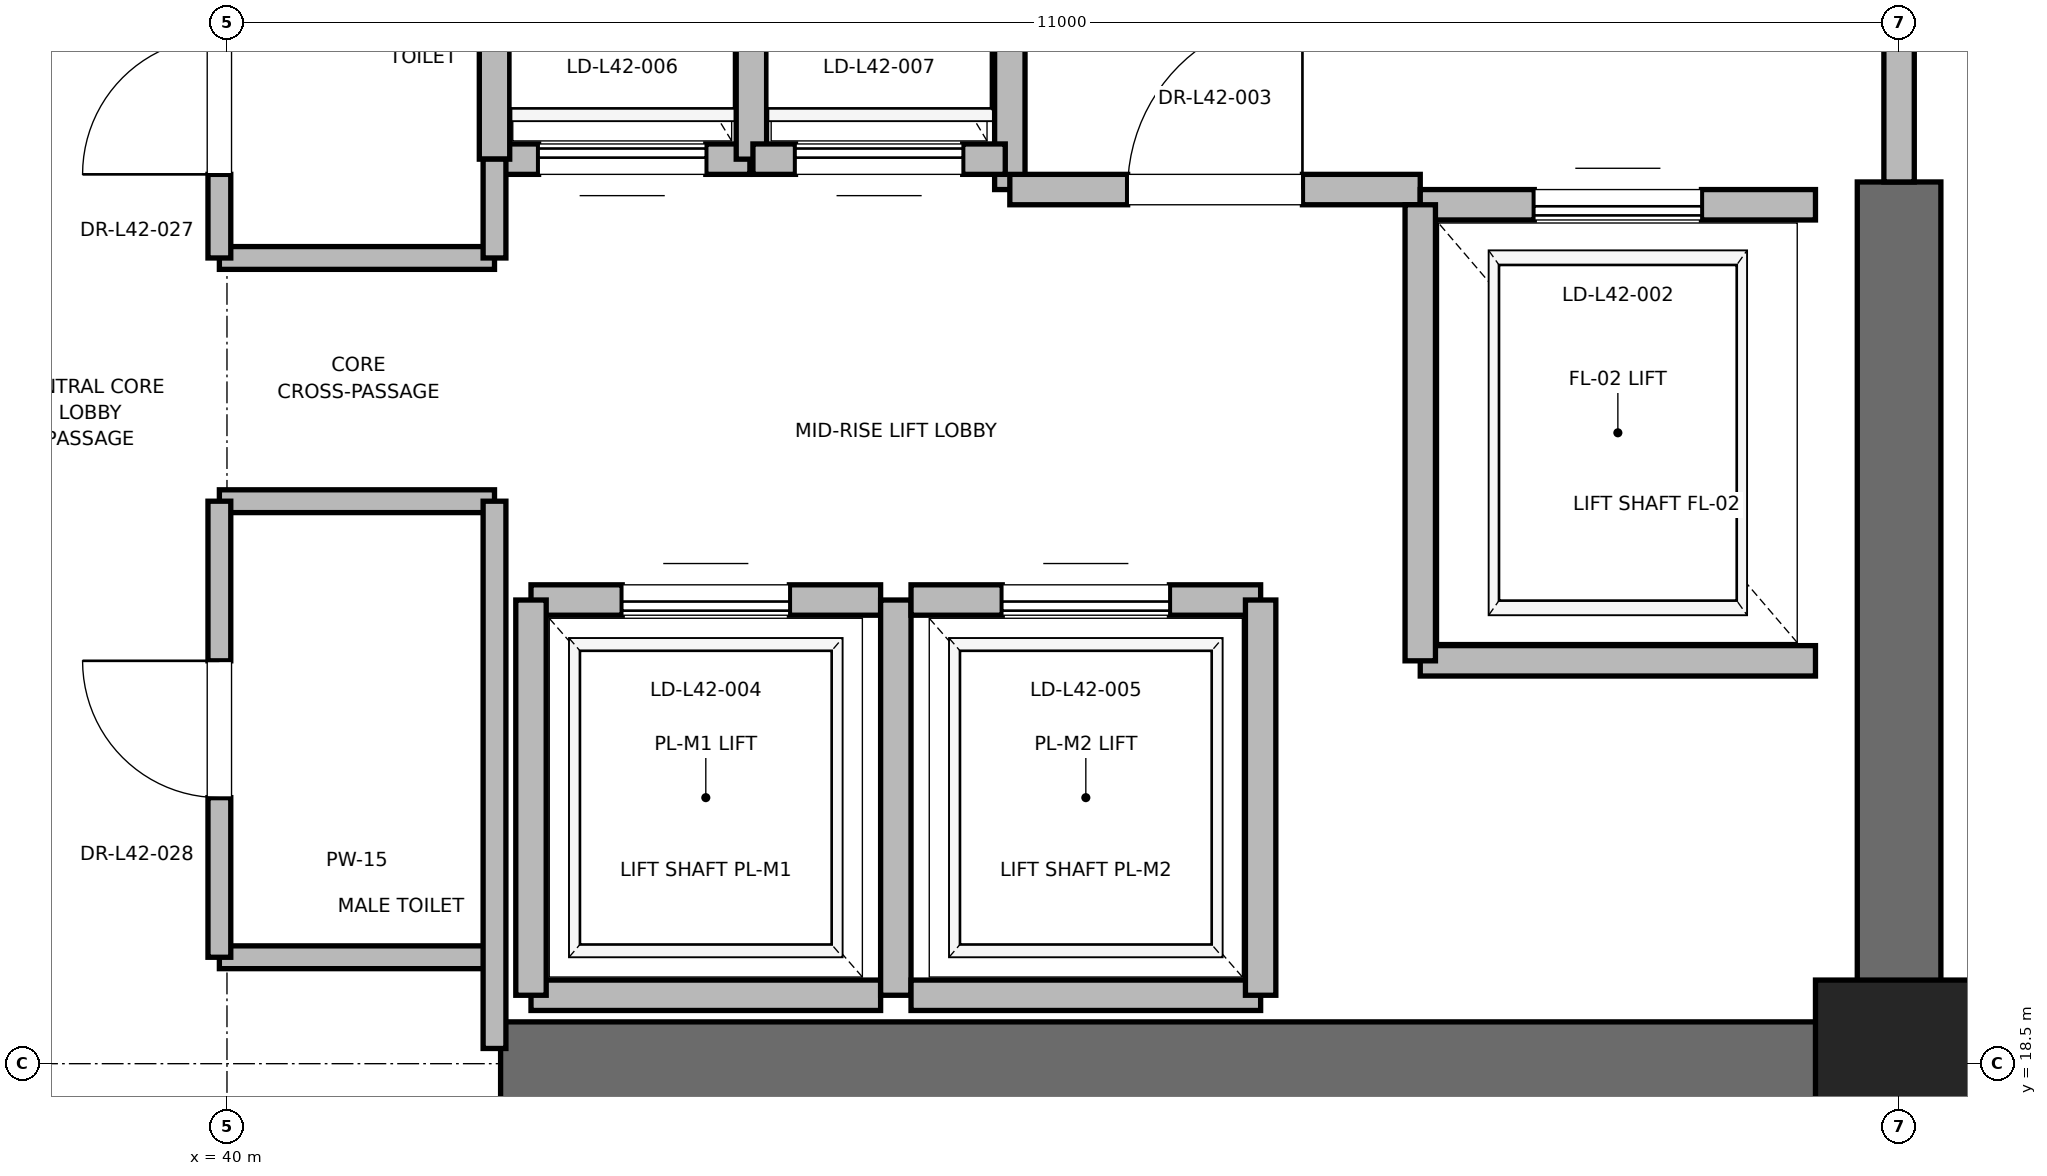
"""IFC4 building model, lengths in metres.
Left out: names, types, materials, properties, quantities, classifications, styles, units other than length and angle.
Written with IfcOpenShell. Run it as: python <this file> out.ifc"""

import sys

from ifc_helpers import new_model, si_unit, direction, frame, frame_2d, origin, origin_2d, place, context, subcontext, project, spatial, rectangle, extrude, element, fill, save


model = new_model("IFC4")
c1 = context("Model", 3, precision=1e-05, world=origin(), true_north=direction((0.0, 1.0)))
c2 = subcontext(c1, "Body", "Model", "MODEL_VIEW")
j1 = project(units=[si_unit("LENGTHUNIT", "METRE"), si_unit("PLANEANGLEUNIT", "RADIAN")], contexts=[c1])
p1 = place(None, origin())
s1 = spatial("IfcSite", under=j1, at=p1, CompositionType="ELEMENT")
p2 = place(p1, origin())
s2 = spatial("IfcBuilding", under=s1, at=p2, CompositionType="ELEMENT")
p3 = place(p2, frame((0.0, 0.0, 180.4)))
s3 = spatial("IfcBuildingStorey", under=s2, at=p3, CompositionType="ELEMENT", Elevation=180.4)
p4 = place(p3, frame((51.0, 18.5, 0.0), z_axis=(0.0, 0.0, 1.0), x_axis=(1.0, 0.0, 0.0)))
e1 = element("IfcColumn", 1, at=p4, inside=s3, PredefinedType="PILASTER", context=c2, shape_type="SweptSolid", body=[
    extrude(rectangle(XDim=1.1, YDim=1.1, at=origin_2d()), origin(), (0.0, 0.0, 1.0), 4.0),
])
p5 = place(p3, frame((41.8, 18.5, 0.0), z_axis=(0.0, 0.0, 1.0), x_axis=(1.0, 0.0, 0.0)))
e2 = element("IfcWall", 2, at=p5, inside=s3, PredefinedType="SHEAR", context=c2, shape_type="SweptSolid", body=[
    extrude(rectangle(XDim=9.2, YDim=0.55, at=frame_2d((4.6, 0.0))), origin(), (0.0, 0.0, 1.0), 3.7),
])
p6 = place(p3, frame((51.0, 18.5, 0.0), z_axis=(0.0, 0.0, 1.0), x_axis=(0.0, 1.0, 0.0)))
e3 = element("IfcWall", 3, at=p6, inside=s3, PredefinedType="SHEAR", context=c2, shape_type="SweptSolid", body=[
    extrude(rectangle(XDim=5.8, YDim=0.55, at=frame_2d((2.9, 0.0))), origin(), (0.0, 0.0, 1.0), 3.7),
])
p7 = place(p3, frame((45.15, 24.25, 0.0), z_axis=(0.0, 0.0, 1.0), x_axis=(0.0, 1.0, 0.0)))
e4 = element("IfcWall", 4, at=p7, inside=s3, PredefinedType="PARTITIONING", context=c2, shape_type="SweptSolid", body=[
    extrude(rectangle(XDim=3.37, YDim=0.2, at=frame_2d((1.685, 0.0))), origin(), (0.0, 0.0, 1.0), 3.7),
])
p8 = place(p3, frame((45.15, 24.25, 0.0), z_axis=(0.0, 0.0, 1.0), x_axis=(1.0, 0.0, 0.0)))
e5 = element("IfcWall", 5, at=p8, inside=s3, PredefinedType="PARTITIONING", context=c2, shape_type="SweptSolid", body=[
    extrude(rectangle(XDim=2.7, YDim=0.2, at=frame_2d((1.35, 0.0))), origin(), (0.0, 0.0, 1.0), 3.7),
])
p9 = place(p8, frame((0.775, 0.0, 0.0)))
e6 = element("IfcOpeningElement", 6, at=p9, cuts=e5, PredefinedType="OPENING", context=c2, shape_type="SweptSolid", body=[
    extrude(rectangle(XDim=1.15, YDim=2.2, at=frame_2d((0.575, 1.1))), frame((0.0, 0.1, 0.0), z_axis=(0.0, -1.0, 0.0), x_axis=(1.0, 0.0, 0.0)), (0.0, 0.0, 1.0), 0.2),
])
p10 = place(p3, frame((51.0, 24.3, 0.0), z_axis=(0.0, 0.0, 1.0), x_axis=(0.0, 1.0, 0.0)))
e7 = element("IfcWall", 7, at=p10, inside=s3, PredefinedType="PARTITIONING", context=c2, shape_type="SweptSolid", body=[
    extrude(rectangle(XDim=3.4, YDim=0.2, at=frame_2d((1.7, 0.0))), origin(), (0.0, 0.0, 1.0), 2.68),
])
p11 = place(p10, frame((1.125, 0.0, 0.0)))
e8 = element("IfcOpeningElement", 8, at=p11, cuts=e7, PredefinedType="OPENING", context=c2, shape_type="SweptSolid", body=[
    extrude(rectangle(XDim=1.15, YDim=2.2, at=frame_2d((0.575, 1.1))), frame((0.0, 0.1, 0.0), z_axis=(0.0, -1.0, 0.0), x_axis=(1.0, 0.0, 0.0)), (0.0, 0.0, 1.0), 0.2),
])
p12 = place(p3, frame((47.85, 21.15, 0.0), z_axis=(0.0, 0.0, 1.0), x_axis=(1.0, 0.0, 0.0)))
e9 = element("IfcWall", 9, at=p12, inside=s3, PredefinedType="SOLIDWALL", context=c2, shape_type="SweptSolid", body=[
    extrude(rectangle(XDim=2.6, YDim=0.2, at=frame_2d((1.3, 0.0))), origin(), (0.0, 0.0, 1.0), 3.7),
])
p13 = place(p3, frame((50.45, 24.15, 0.0), z_axis=(0.0, 0.0, 1.0), x_axis=(-1.0, 0.0, 0.0)))
e10 = element("IfcWall", 10, at=p13, inside=s3, PredefinedType="SOLIDWALL", context=c2, shape_type="SweptSolid", body=[
    extrude(rectangle(XDim=2.6, YDim=0.2, at=frame_2d((1.3, 0.0))), origin(), (0.0, 0.0, 1.0), 2.68),
])
p14 = place(p13, frame((0.75, 0.0, 0.0)))
e11 = element("IfcOpeningElement", 11, at=p14, cuts=e10, PredefinedType="OPENING", context=c2, shape_type="SweptSolid", body=[
    extrude(rectangle(XDim=1.1, YDim=2.2, at=frame_2d((0.55, 1.1))), frame((0.0, 0.1, 0.0), z_axis=(0.0, -1.0, 0.0), x_axis=(1.0, 0.0, 0.0)), (0.0, 0.0, 1.0), 0.2),
])
p15 = place(p3, frame((47.85, 24.15, 0.0), z_axis=(0.0, 0.0, 1.0), x_axis=(0.0, -1.0, 0.0)))
e12 = element("IfcWall", 12, at=p15, inside=s3, PredefinedType="SOLIDWALL", context=c2, shape_type="SweptSolid", body=[
    extrude(rectangle(XDim=3.0, YDim=0.2, at=frame_2d((1.5, 0.0))), origin(), (0.0, 0.0, 1.0), 3.7),
])
p16 = place(p3, frame((42.0, 18.95, 0.0), z_axis=(0.0, 0.0, 1.0), x_axis=(1.0, 0.0, 0.0)))
e13 = element("IfcWall", 13, at=p16, inside=s3, PredefinedType="SOLIDWALL", context=c2, shape_type="SweptSolid", body=[
    extrude(rectangle(XDim=2.3, YDim=0.2, at=frame_2d((1.15, 0.0))), origin(), (0.0, 0.0, 1.0), 2.68),
])
p17 = place(p3, frame((44.3, 21.55, 0.0), z_axis=(0.0, 0.0, 1.0), x_axis=(-1.0, 0.0, 0.0)))
e14 = element("IfcWall", 14, at=p17, inside=s3, PredefinedType="SOLIDWALL", context=c2, shape_type="SweptSolid", body=[
    extrude(rectangle(XDim=2.3, YDim=0.2, at=frame_2d((1.15, 0.0))), origin(), (0.0, 0.0, 1.0), 3.7),
])
p18 = place(p17, frame((0.6, 0.0, 0.0)))
e15 = element("IfcOpeningElement", 15, at=p18, cuts=e14, PredefinedType="OPENING", context=c2, shape_type="SweptSolid", body=[
    extrude(rectangle(XDim=1.1, YDim=2.2, at=frame_2d((0.55, 1.1))), frame((0.0, 0.1, 0.0), z_axis=(0.0, -1.0, 0.0), x_axis=(1.0, 0.0, 0.0)), (0.0, 0.0, 1.0), 0.2),
])
p19 = place(p3, frame((42.0, 21.55, 0.0), z_axis=(0.0, 0.0, 1.0), x_axis=(0.0, -1.0, 0.0)))
e16 = element("IfcWall", 16, at=p19, inside=s3, PredefinedType="SOLIDWALL", context=c2, shape_type="SweptSolid", body=[
    extrude(rectangle(XDim=2.6, YDim=0.2, at=frame_2d((1.3, 0.0))), origin(), (0.0, 0.0, 1.0), 2.68),
])
p20 = place(p3, frame((44.4, 18.95, 0.0), z_axis=(0.0, 0.0, 1.0), x_axis=(0.0, 1.0, 0.0)))
e17 = element("IfcWall", 17, at=p20, inside=s3, PredefinedType="SOLIDWALL", context=c2, shape_type="SweptSolid", body=[
    extrude(rectangle(XDim=2.6, YDim=0.2, at=frame_2d((1.3, 0.0))), origin(), (0.0, 0.0, 1.0), 3.7),
])
p21 = place(p3, frame((44.5, 18.95, 0.0), z_axis=(0.0, 0.0, 1.0), x_axis=(1.0, 0.0, 0.0)))
e18 = element("IfcWall", 18, at=p21, inside=s3, PredefinedType="SOLIDWALL", context=c2, shape_type="SweptSolid", body=[
    extrude(rectangle(XDim=2.3, YDim=0.2, at=frame_2d((1.15, 0.0))), origin(), (0.0, 0.0, 1.0), 3.7),
])
p22 = place(p3, frame((46.8, 21.55, 0.0), z_axis=(0.0, 0.0, 1.0), x_axis=(-1.0, 0.0, 0.0)))
e19 = element("IfcWall", 19, at=p22, inside=s3, PredefinedType="SOLIDWALL", context=c2, shape_type="SweptSolid", body=[
    extrude(rectangle(XDim=2.3, YDim=0.2, at=frame_2d((1.15, 0.0))), origin(), (0.0, 0.0, 1.0), 3.7),
])
p23 = place(p22, frame((0.6, 0.0, 0.0)))
e20 = element("IfcOpeningElement", 20, at=p23, cuts=e19, PredefinedType="OPENING", context=c2, shape_type="SweptSolid", body=[
    extrude(rectangle(XDim=1.1, YDim=2.2, at=frame_2d((0.55, 1.1))), frame((0.0, 0.1, 0.0), z_axis=(0.0, -1.0, 0.0), x_axis=(1.0, 0.0, 0.0)), (0.0, 0.0, 1.0), 0.2),
])
p24 = place(p3, frame((46.8, 18.95, 0.0), z_axis=(0.0, 0.0, 1.0), x_axis=(0.0, 1.0, 0.0)))
e21 = element("IfcWall", 21, at=p24, inside=s3, PredefinedType="SOLIDWALL", context=c2, shape_type="SweptSolid", body=[
    extrude(rectangle(XDim=2.6, YDim=0.2, at=frame_2d((1.3, 0.0))), origin(), (0.0, 0.0, 1.0), 3.7),
])
p25 = place(p3, frame((41.76, 24.45, 0.0), z_axis=(0.0, 0.0, 1.0), x_axis=(1.0, 0.0, 0.0)))
e22 = element("IfcWall", 22, at=p25, inside=s3, PredefinedType="SOLIDWALL", context=c2, shape_type="SweptSolid", body=[
    extrude(rectangle(XDim=1.68, YDim=0.2, at=frame_2d((0.84, 0.0))), origin(), (0.0, 0.0, 1.0), 3.7),
])
p26 = place(p25, frame((0.29, 0.0, 0.0)))
e23 = element("IfcOpeningElement", 23, at=p26, cuts=e22, PredefinedType="OPENING", context=c2, shape_type="SweptSolid", body=[
    extrude(rectangle(XDim=1.1, YDim=2.2, at=frame_2d((0.55, 1.1))), frame((0.0, 0.1, 0.0), z_axis=(0.0, -1.0, 0.0), x_axis=(1.0, 0.0, 0.0)), (0.0, 0.0, 1.0), 0.2),
])
for number, where, z_axis, x_axis in (
    (24, (41.76, 27.05, 0.0), (0.0, 0.0, 1.0), (0.0, -1.0, 0.0)),
    (25, (43.45, 24.45, 0.0), (0.0, 0.0, 1.0), (0.0, 1.0, 0.0)),
):
    element("IfcWall", number, at=place(p3, frame(where, z_axis=z_axis, x_axis=x_axis)), inside=s3, PredefinedType="SOLIDWALL", context=c2, shape_type="SweptSolid", body=[
        extrude(rectangle(XDim=2.6, YDim=0.2, at=frame_2d((1.3, 0.0))), origin(), (0.0, 0.0, 1.0), 3.7),
    ])
p27 = place(p3, frame((43.46, 24.45, 0.0), z_axis=(0.0, 0.0, 1.0), x_axis=(1.0, 0.0, 0.0)))
e26 = element("IfcWall", 26, at=p27, inside=s3, PredefinedType="SOLIDWALL", context=c2, shape_type="SweptSolid", body=[
    extrude(rectangle(XDim=1.66, YDim=0.2, at=frame_2d((0.83, 0.0))), origin(), (0.0, 0.0, 1.0), 3.7),
])
p28 = place(p27, frame((0.28, 0.0, 0.0)))
e27 = element("IfcOpeningElement", 27, at=p28, cuts=e26, PredefinedType="OPENING", context=c2, shape_type="SweptSolid", body=[
    extrude(rectangle(XDim=1.1, YDim=2.2, at=frame_2d((0.55, 1.1))), frame((0.0, 0.1, 0.0), z_axis=(0.0, -1.0, 0.0), x_axis=(1.0, 0.0, 0.0)), (0.0, 0.0, 1.0), 0.2),
])
for number, where, z_axis, x_axis in (
    (28, (39.95, 19.2, 0.0), (0.0, 0.0, 1.0), (1.0, 0.0, 0.0)),
    (29, (39.95, 22.2, 0.0), (0.0, 0.0, 1.0), (1.0, 0.0, 0.0)),
    (30, (39.95, 23.8, 0.0), (0.0, 0.0, 1.0), (1.0, 0.0, 0.0)),
):
    element("IfcWall", number, at=place(p3, frame(where, z_axis=z_axis, x_axis=x_axis)), inside=s3, PredefinedType="PARTITIONING", context=c2, shape_type="SweptSolid", body=[
        extrude(rectangle(XDim=1.81, YDim=0.15, at=frame_2d((0.905, 0.0))), origin(), (0.0, 0.0, 1.0), 2.85),
    ])
p29 = place(p3, frame((41.76, 18.6, 0.0), z_axis=(0.0, 0.0, 1.0), x_axis=(0.0, 1.0, 0.0)))
e31 = element("IfcWall", 31, at=p29, inside=s3, PredefinedType="PARTITIONING", context=c2, shape_type="SweptSolid", body=[
    extrude(rectangle(XDim=3.6, YDim=0.15, at=frame_2d((1.8, 0.0))), origin(), (0.0, 0.0, 1.0), 2.68),
])
p30 = place(p3, frame((41.76, 23.8, 0.0), z_axis=(0.0, 0.0, 1.0), x_axis=(0.0, 1.0, 0.0)))
e32 = element("IfcWall", 32, at=p30, inside=s3, PredefinedType="PARTITIONING", context=c2, shape_type="SweptSolid", body=[
    extrude(rectangle(XDim=0.65, YDim=0.15, at=frame_2d((0.325, 0.0))), origin(), (0.0, 0.0, 1.0), 2.85),
])
p31 = place(p3, frame((39.95, 19.2, 0.0), z_axis=(0.0, 0.0, 1.0), x_axis=(0.0, 1.0, 0.0)))
e33 = element("IfcWall", 33, at=p31, inside=s3, PredefinedType="PARTITIONING", context=c2, shape_type="SweptSolid", body=[
    extrude(rectangle(XDim=3.0, YDim=0.15, at=frame_2d((1.5, 0.0))), origin(), (0.0, 0.0, 1.0), 2.85),
])
p32 = place(p31, frame((1.05, 0.0, 0.0)))
e34 = element("IfcOpeningElement", 34, at=p32, cuts=e33, PredefinedType="OPENING", context=c2, shape_type="SweptSolid", body=[
    extrude(rectangle(XDim=0.9, YDim=2.1, at=frame_2d((0.45, 1.05))), frame((0.0, 0.075, 0.0), z_axis=(0.0, -1.0, 0.0), x_axis=(1.0, 0.0, 0.0)), (0.0, 0.0, 1.0), 0.15),
])
p33 = place(p3, frame((39.95, 23.8, 0.0), z_axis=(0.0, 0.0, 1.0), x_axis=(0.0, 1.0, 0.0)))
e35 = element("IfcWall", 35, at=p33, inside=s3, PredefinedType="PARTITIONING", context=c2, shape_type="SweptSolid", body=[
    extrude(rectangle(XDim=2.0, YDim=0.15, at=frame_2d((1.0, 0.0))), origin(), (0.0, 0.0, 1.0), 2.85),
])
p34 = place(p33, frame((0.55, 0.0, 0.0)))
e36 = element("IfcOpeningElement", 36, at=p34, cuts=e35, PredefinedType="OPENING", context=c2, shape_type="SweptSolid", body=[
    extrude(rectangle(XDim=0.9, YDim=2.1, at=frame_2d((0.45, 1.05))), frame((0.0, 0.075, 0.0), z_axis=(0.0, -1.0, 0.0), x_axis=(1.0, 0.0, 0.0)), (0.0, 0.0, 1.0), 0.15),
])
p35 = place(p9, origin())
e37 = element("IfcDoor", 37, at=p35, inside=s3, OperationType="SINGLE_SWING_RIGHT", PredefinedType="DOOR", context=c2, shape_type="SweptSolid", body=[
    extrude(rectangle(XDim=1.15, YDim=2.2, at=frame_2d((0.575, 1.1))), frame((0.0, 0.025, 0.0), z_axis=(0.0, -1.0, 0.0), x_axis=(1.0, 0.0, 0.0)), (0.0, 0.0, 1.0), 0.05),
])
fill(e6, e37)
p36 = place(p14, origin())
e38 = element("IfcDoor", 38, at=p36, inside=s3, OperationType="SLIDING_TO_RIGHT", PredefinedType="DOOR", context=c2, shape_type="SweptSolid", body=[
    extrude(rectangle(XDim=1.1, YDim=2.2, at=frame_2d((0.55, 1.1))), frame((0.0, 0.025, 0.0), z_axis=(0.0, -1.0, 0.0), x_axis=(1.0, 0.0, 0.0)), (0.0, 0.0, 1.0), 0.05),
])
fill(e11, e38)
p37 = place(p18, origin())
e39 = element("IfcDoor", 39, at=p37, inside=s3, OperationType="SLIDING_TO_RIGHT", PredefinedType="DOOR", context=c2, shape_type="SweptSolid", body=[
    extrude(rectangle(XDim=1.1, YDim=2.2, at=frame_2d((0.55, 1.1))), frame((0.0, 0.025, 0.0), z_axis=(0.0, -1.0, 0.0), x_axis=(1.0, 0.0, 0.0)), (0.0, 0.0, 1.0), 0.05),
])
fill(e15, e39)
p38 = place(p23, origin())
e40 = element("IfcDoor", 40, at=p38, inside=s3, OperationType="SLIDING_TO_RIGHT", PredefinedType="DOOR", context=c2, shape_type="SweptSolid", body=[
    extrude(rectangle(XDim=1.1, YDim=2.2, at=frame_2d((0.55, 1.1))), frame((0.0, 0.025, 0.0), z_axis=(0.0, -1.0, 0.0), x_axis=(1.0, 0.0, 0.0)), (0.0, 0.0, 1.0), 0.05),
])
fill(e20, e40)
p39 = place(p26, origin())
e41 = element("IfcDoor", 41, at=p39, inside=s3, OperationType="SLIDING_TO_RIGHT", PredefinedType="DOOR", context=c2, shape_type="SweptSolid", body=[
    extrude(rectangle(XDim=1.1, YDim=2.2, at=frame_2d((0.55, 1.1))), frame((0.0, 0.025, 0.0), z_axis=(0.0, -1.0, 0.0), x_axis=(1.0, 0.0, 0.0)), (0.0, 0.0, 1.0), 0.05),
])
fill(e23, e41)
p40 = place(p28, origin())
e42 = element("IfcDoor", 42, at=p40, inside=s3, OperationType="SLIDING_TO_RIGHT", PredefinedType="DOOR", context=c2, shape_type="SweptSolid", body=[
    extrude(rectangle(XDim=1.1, YDim=2.2, at=frame_2d((0.55, 1.1))), frame((0.0, 0.025, 0.0), z_axis=(0.0, -1.0, 0.0), x_axis=(1.0, 0.0, 0.0)), (0.0, 0.0, 1.0), 0.05),
])
fill(e27, e42)
p41 = place(p32, origin())
e43 = element("IfcDoor", 43, at=p41, inside=s3, OperationType="SINGLE_SWING_RIGHT", PredefinedType="DOOR", context=c2, shape_type="SweptSolid", body=[
    extrude(rectangle(XDim=0.9, YDim=2.1, at=frame_2d((0.45, 1.05))), frame((0.0, 0.025, 0.0), z_axis=(0.0, -1.0, 0.0), x_axis=(1.0, 0.0, 0.0)), (0.0, 0.0, 1.0), 0.05),
])
fill(e34, e43)
p42 = place(p34, origin())
e44 = element("IfcDoor", 44, at=p42, inside=s3, OperationType="SINGLE_SWING_LEFT", PredefinedType="DOOR", context=c2, shape_type="SweptSolid", body=[
    extrude(rectangle(XDim=0.9, YDim=2.1, at=frame_2d((0.45, 1.05))), frame((0.0, 0.025, 0.0), z_axis=(0.0, -1.0, 0.0), x_axis=(1.0, 0.0, 0.0)), (0.0, 0.0, 1.0), 0.05),
])
fill(e36, e44)
save(model, sys.argv[1])
